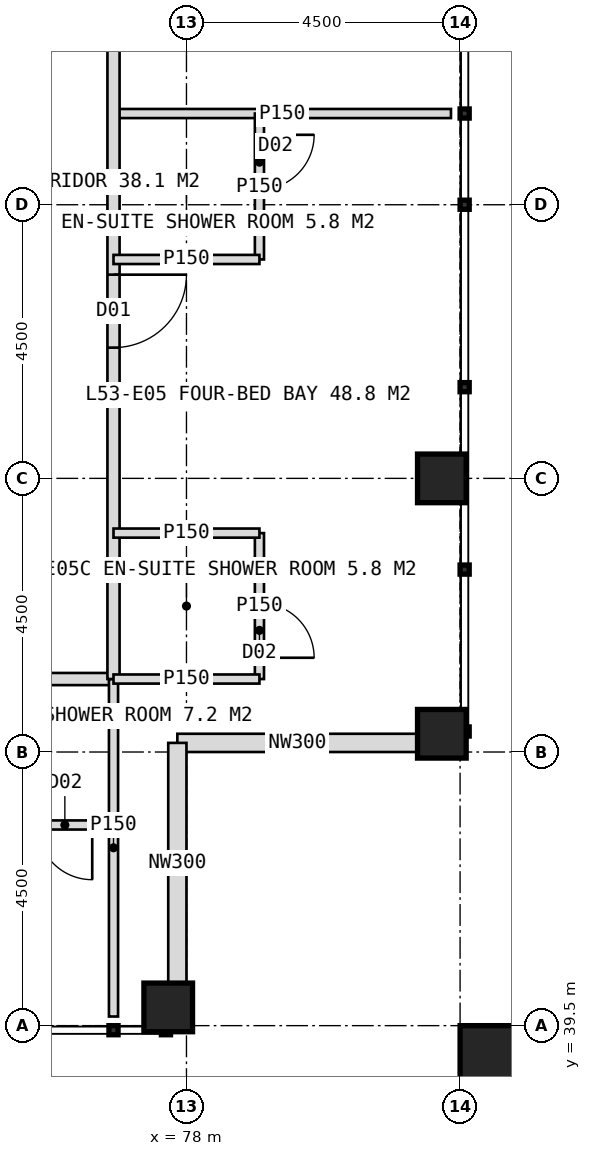
"""IFC4 building model, lengths in metres.
Left out: names, types, materials, properties, quantities, classifications, styles, units other than length and angle.
Written with IfcOpenShell. Run it as: python <this file> out.ifc"""

import sys

from ifc_helpers import new_model, si_unit, direction, frame, frame_2d, origin, origin_2d, place, context, subcontext, project, spatial, rectangle, hollow_rectangle, extrude, element, fill, save


model = new_model("IFC4")
c1 = context("Model", 3, precision=1e-05, world=origin(), true_north=direction((0.0, 1.0)))
c2 = subcontext(c1, "Body", "Model", "MODEL_VIEW")
j1 = project(units=[si_unit("LENGTHUNIT", "METRE"), si_unit("PLANEANGLEUNIT", "RADIAN")], contexts=[c1])
p1 = place(None, origin())
s1 = spatial("IfcSite", under=j1, at=p1, CompositionType="ELEMENT")
p2 = place(p1, origin())
s2 = spatial("IfcBuilding", under=s1, at=p2, CompositionType="ELEMENT")
p3 = place(p2, frame((0.0, 0.0, 221.0)))
s3 = spatial("IfcBuildingStorey", under=s2, at=p3, CompositionType="ELEMENT", Elevation=221.0)
for number, where, z_axis, x_axis in (
    (1, (82.2, 44.3, 0.0), (0.0, 0.0, 1.0), (1.0, 0.0, 0.0)),
    (2, (82.2, 48.5, 0.0), (0.0, 0.0, 1.0), (1.0, 0.0, 0.0)),
    (3, (77.7, 39.8, 0.0), (0.0, 0.0, 1.0), (1.0, 0.0, 0.0)),
):
    element("IfcColumn", number, at=place(p3, frame(where, z_axis=z_axis, x_axis=x_axis)), inside=s3, PredefinedType="COLUMN", context=c2, shape_type="SweptSolid", body=[
        extrude(hollow_rectangle(XDim=0.8, YDim=0.8, WallThickness=0.08, at=origin_2d()), origin(), (0.0, 0.0, 1.0), 4.0),
    ])
p4 = place(p3, frame((83.1, 38.9, 0.0), z_axis=(0.0, 0.0, 1.0), x_axis=(1.0, 0.0, 0.0)))
e4 = element("IfcColumn", 4, at=p4, inside=s3, PredefinedType="COLUMN", context=c2, shape_type="SweptSolid", body=[
    extrude(hollow_rectangle(XDim=1.2, YDim=1.2, WallThickness=0.07, at=origin_2d()), origin(), (0.0, 0.0, 1.0), 4.0),
])
for number, where, z_axis, x_axis in (
    (5, (81.8, 44.15, 0.0), (0.0, 0.0, 1.0), (-1.0, 0.0, 0.0)),
    (6, (77.85, 44.15, 0.0), (0.0, 0.0, 1.0), (0.0, -1.0, 0.0)),
):
    element("IfcWall", number, at=place(p3, frame(where, z_axis=z_axis, x_axis=x_axis)), inside=s3, PredefinedType="ELEMENTEDWALL", context=c2, shape_type="SweptSolid", body=[
        extrude(rectangle(XDim=3.95, YDim=0.3, at=frame_2d((1.975, 0.0))), origin(), (0.0, 0.0, 1.0), 2.85),
    ])
p5 = place(p3, frame((76.8, 45.2, 0.0), z_axis=(0.0, 0.0, 1.0), x_axis=(-1.0, 0.0, 0.0)))
e7 = element("IfcWall", 7, at=p5, inside=s3, PredefinedType="PARTITIONING", context=c2, shape_type="SweptSolid", body=[
    extrude(rectangle(XDim=33.6, YDim=0.2, at=frame_2d((16.8, 0.0))), origin(), (0.0, 0.0, 1.0), 3.75),
])
p6 = place(p5, frame((3.25, 0.0, 0.0)))
e8 = element("IfcOpeningElement", 8, at=p6, cuts=e7, PredefinedType="OPENING", context=c2, shape_type="SweptSolid", body=[
    extrude(rectangle(XDim=1.2, YDim=2.2, at=frame_2d((0.6, 1.1))), frame((0.0, 0.11, 0.0), z_axis=(0.0, -1.0, 0.0), x_axis=(1.0, 0.0, 0.0)), (0.0, 0.0, 1.0), 0.22),
])
p7 = place(p5, frame((11.05, 0.0, 0.0)))
e9 = element("IfcOpeningElement", 9, at=p7, cuts=e7, PredefinedType="OPENING", context=c2, shape_type="SweptSolid", body=[
    extrude(rectangle(XDim=1.2, YDim=2.2, at=frame_2d((0.6, 1.1))), frame((0.0, 0.11, 0.0), z_axis=(0.0, -1.0, 0.0), x_axis=(1.0, 0.0, 0.0)), (0.0, 0.0, 1.0), 0.22),
])
p8 = place(p5, frame((20.05, 0.0, 0.0)))
e10 = element("IfcOpeningElement", 10, at=p8, cuts=e7, PredefinedType="OPENING", context=c2, shape_type="SweptSolid", body=[
    extrude(rectangle(XDim=1.2, YDim=2.2, at=frame_2d((0.6, 1.1))), frame((0.0, 0.11, 0.0), z_axis=(0.0, -1.0, 0.0), x_axis=(1.0, 0.0, 0.0)), (0.0, 0.0, 1.0), 0.22),
])
p9 = place(p5, frame((29.05, 0.0, 0.0)))
e11 = element("IfcOpeningElement", 11, at=p9, cuts=e7, PredefinedType="OPENING", context=c2, shape_type="SweptSolid", body=[
    extrude(rectangle(XDim=1.2, YDim=2.2, at=frame_2d((0.6, 1.1))), frame((0.0, 0.11, 0.0), z_axis=(0.0, -1.0, 0.0), x_axis=(1.0, 0.0, 0.0)), (0.0, 0.0, 1.0), 0.22),
])
p10 = place(p3, frame((76.8, 45.2, 0.0), z_axis=(0.0, 0.0, 1.0), x_axis=(0.0, -1.0, 0.0)))
e12 = element("IfcWall", 12, at=p10, inside=s3, PredefinedType="PARTITIONING", context=c2, shape_type="SweptSolid", body=[
    extrude(rectangle(XDim=5.55, YDim=0.15, at=frame_2d((2.775, 0.0))), origin(), (0.0, 0.0, 1.0), 3.75),
])
p11 = place(p3, frame((76.8, 42.8, 0.0), z_axis=(0.0, 0.0, 1.0), x_axis=(-1.0, 0.0, 0.0)))
e13 = element("IfcWall", 13, at=p11, inside=s3, PredefinedType="PARTITIONING", context=c2, shape_type="SweptSolid", body=[
    extrude(rectangle(XDim=3.0, YDim=0.15, at=frame_2d((1.5, 0.0))), origin(), (0.0, 0.0, 1.0), 3.75),
])
p12 = place(p11, frame((0.35, 0.0, 0.0)))
e14 = element("IfcOpeningElement", 14, at=p12, cuts=e13, PredefinedType="OPENING", context=c2, shape_type="SweptSolid", body=[
    extrude(rectangle(XDim=0.9, YDim=2.1, at=frame_2d((0.45, 1.05))), frame((0.0, 0.085, 0.0), z_axis=(0.0, -1.0, 0.0), x_axis=(1.0, 0.0, 0.0)), (0.0, 0.0, 1.0), 0.17),
])
p13 = place(p3, frame((76.8, 54.5, 0.0), z_axis=(0.0, 0.0, 1.0), x_axis=(1.0, 0.0, 0.0)))
e15 = element("IfcWall", 15, at=p13, inside=s3, PredefinedType="PARTITIONING", context=c2, shape_type="SweptSolid", body=[
    extrude(rectangle(XDim=5.55, YDim=0.15, at=frame_2d((2.775, 0.0))), origin(), (0.0, 0.0, 1.0), 3.75),
])
p14 = place(p3, frame((76.8, 78.8, 0.0), z_axis=(0.0, 0.0, 1.0), x_axis=(0.0, -1.0, 0.0)))
e16 = element("IfcWall", 16, at=p14, inside=s3, PredefinedType="PARTITIONING", context=c2, shape_type="SweptSolid", body=[
    extrude(rectangle(XDim=33.6, YDim=0.2, at=frame_2d((16.8, 0.0))), origin(), (0.0, 0.0, 1.0), 3.75),
])
p15 = place(p14, frame((3.25, 0.0, 0.0)))
e17 = element("IfcOpeningElement", 17, at=p15, cuts=e16, PredefinedType="OPENING", context=c2, shape_type="SweptSolid", body=[
    extrude(rectangle(XDim=1.2, YDim=2.2, at=frame_2d((0.6, 1.1))), frame((0.0, 0.11, 0.0), z_axis=(0.0, -1.0, 0.0), x_axis=(1.0, 0.0, 0.0)), (0.0, 0.0, 1.0), 0.22),
])
p16 = place(p14, frame((10.45, 0.0, 0.0)))
e18 = element("IfcOpeningElement", 18, at=p16, cuts=e16, PredefinedType="OPENING", context=c2, shape_type="SweptSolid", body=[
    extrude(rectangle(XDim=1.2, YDim=2.2, at=frame_2d((0.6, 1.1))), frame((0.0, 0.11, 0.0), z_axis=(0.0, -1.0, 0.0), x_axis=(1.0, 0.0, 0.0)), (0.0, 0.0, 1.0), 0.22),
])
p17 = place(p14, frame((14.8, 0.0, 0.0)))
e19 = element("IfcOpeningElement", 19, at=p17, cuts=e16, PredefinedType="OPENING", context=c2, shape_type="SweptSolid", body=[
    extrude(rectangle(XDim=1.0, YDim=2.1, at=frame_2d((0.5, 1.05))), frame((0.0, 0.11, 0.0), z_axis=(0.0, -1.0, 0.0), x_axis=(1.0, 0.0, 0.0)), (0.0, 0.0, 1.0), 0.22),
])
p18 = place(p14, frame((20.05, 0.0, 0.0)))
e20 = element("IfcOpeningElement", 20, at=p18, cuts=e16, PredefinedType="OPENING", context=c2, shape_type="SweptSolid", body=[
    extrude(rectangle(XDim=1.2, YDim=2.2, at=frame_2d((0.6, 1.1))), frame((0.0, 0.11, 0.0), z_axis=(0.0, -1.0, 0.0), x_axis=(1.0, 0.0, 0.0)), (0.0, 0.0, 1.0), 0.22),
])
p19 = place(p14, frame((26.95, 0.0, 0.0)))
e21 = element("IfcOpeningElement", 21, at=p19, cuts=e16, PredefinedType="OPENING", context=c2, shape_type="SweptSolid", body=[
    extrude(rectangle(XDim=1.2, YDim=2.2, at=frame_2d((0.6, 1.1))), frame((0.0, 0.11, 0.0), z_axis=(0.0, -1.0, 0.0), x_axis=(1.0, 0.0, 0.0)), (0.0, 0.0, 1.0), 0.22),
])
p20 = place(p3, frame((79.2, 54.5, 0.0), z_axis=(0.0, 0.0, 1.0), x_axis=(0.0, -1.0, 0.0)))
e22 = element("IfcWall", 22, at=p20, inside=s3, PredefinedType="PARTITIONING", context=c2, shape_type="SweptSolid", body=[
    extrude(rectangle(XDim=2.4, YDim=0.15, at=frame_2d((1.2, 0.0))), origin(), (0.0, 0.0, 1.0), 3.75),
])
p21 = place(p20, frame((0.35, 0.0, 0.0)))
e23 = element("IfcOpeningElement", 23, at=p21, cuts=e22, PredefinedType="OPENING", context=c2, shape_type="SweptSolid", body=[
    extrude(rectangle(XDim=0.9, YDim=2.1, at=frame_2d((0.45, 1.05))), frame((0.0, 0.085, 0.0), z_axis=(0.0, -1.0, 0.0), x_axis=(1.0, 0.0, 0.0)), (0.0, 0.0, 1.0), 0.17),
])
p22 = place(p3, frame((76.8, 52.1, 0.0), z_axis=(0.0, 0.0, 1.0), x_axis=(1.0, 0.0, 0.0)))
e24 = element("IfcWall", 24, at=p22, inside=s3, PredefinedType="PARTITIONING", context=c2, shape_type="SweptSolid", body=[
    extrude(rectangle(XDim=2.4, YDim=0.15, at=frame_2d((1.2, 0.0))), origin(), (0.0, 0.0, 1.0), 3.75),
])
p23 = place(p3, frame((79.2, 47.6, 0.0), z_axis=(0.0, 0.0, 1.0), x_axis=(0.0, -1.0, 0.0)))
e25 = element("IfcWall", 25, at=p23, inside=s3, PredefinedType="PARTITIONING", context=c2, shape_type="SweptSolid", body=[
    extrude(rectangle(XDim=2.4, YDim=0.15, at=frame_2d((1.2, 0.0))), origin(), (0.0, 0.0, 1.0), 3.75),
])
p24 = place(p23, frame((1.15, 0.0, 0.0)))
e26 = element("IfcOpeningElement", 26, at=p24, cuts=e25, PredefinedType="OPENING", context=c2, shape_type="SweptSolid", body=[
    extrude(rectangle(XDim=0.9, YDim=2.1, at=frame_2d((0.45, 1.05))), frame((0.0, 0.085, 0.0), z_axis=(0.0, -1.0, 0.0), x_axis=(1.0, 0.0, 0.0)), (0.0, 0.0, 1.0), 0.17),
])
for number, where, z_axis, x_axis in (
    (27, (76.8, 47.6, 0.0), (0.0, 0.0, 1.0), (1.0, 0.0, 0.0)),
    (28, (76.8, 45.2, 0.0), (0.0, 0.0, 1.0), (1.0, 0.0, 0.0)),
):
    element("IfcWall", number, at=place(p3, frame(where, z_axis=z_axis, x_axis=x_axis)), inside=s3, PredefinedType="PARTITIONING", context=c2, shape_type="SweptSolid", body=[
        extrude(rectangle(XDim=2.4, YDim=0.15, at=frame_2d((1.2, 0.0))), origin(), (0.0, 0.0, 1.0), 3.75),
    ])
p25 = place(p12, origin())
e29 = element("IfcDoor", 29, at=p25, inside=s3, OperationType="SINGLE_SWING_LEFT", PredefinedType="DOOR", context=c2, shape_type="SweptSolid", body=[
    extrude(rectangle(XDim=0.9, YDim=2.1, at=frame_2d((0.45, 1.05))), frame((0.0, 0.025, 0.0), z_axis=(0.0, -1.0, 0.0), x_axis=(1.0, 0.0, 0.0)), (0.0, 0.0, 1.0), 0.05),
])
fill(e14, e29)
p26 = place(p19, origin())
e30 = element("IfcDoor", 30, at=p26, inside=s3, OperationType="SINGLE_SWING_LEFT", PredefinedType="DOOR", context=c2, shape_type="SweptSolid", body=[
    extrude(rectangle(XDim=1.2, YDim=2.2, at=frame_2d((0.6, 1.1))), frame((0.0, 0.025, 0.0), z_axis=(0.0, -1.0, 0.0), x_axis=(1.0, 0.0, 0.0)), (0.0, 0.0, 1.0), 0.05),
])
fill(e21, e30)
p27 = place(p21, origin())
e31 = element("IfcDoor", 31, at=p27, inside=s3, OperationType="SINGLE_SWING_LEFT", PredefinedType="DOOR", context=c2, shape_type="SweptSolid", body=[
    extrude(rectangle(XDim=0.9, YDim=2.1, at=frame_2d((0.45, 1.05))), frame((0.0, 0.025, 0.0), z_axis=(0.0, -1.0, 0.0), x_axis=(1.0, 0.0, 0.0)), (0.0, 0.0, 1.0), 0.05),
])
fill(e23, e31)
p28 = place(p24, origin())
e32 = element("IfcDoor", 32, at=p28, inside=s3, OperationType="SINGLE_SWING_RIGHT", PredefinedType="DOOR", context=c2, shape_type="SweptSolid", body=[
    extrude(rectangle(XDim=0.9, YDim=2.1, at=frame_2d((0.45, 1.05))), frame((0.0, 0.025, 0.0), z_axis=(0.0, -1.0, 0.0), x_axis=(1.0, 0.0, 0.0)), (0.0, 0.0, 1.0), 0.05),
])
fill(e26, e32)
save(model, sys.argv[1])
